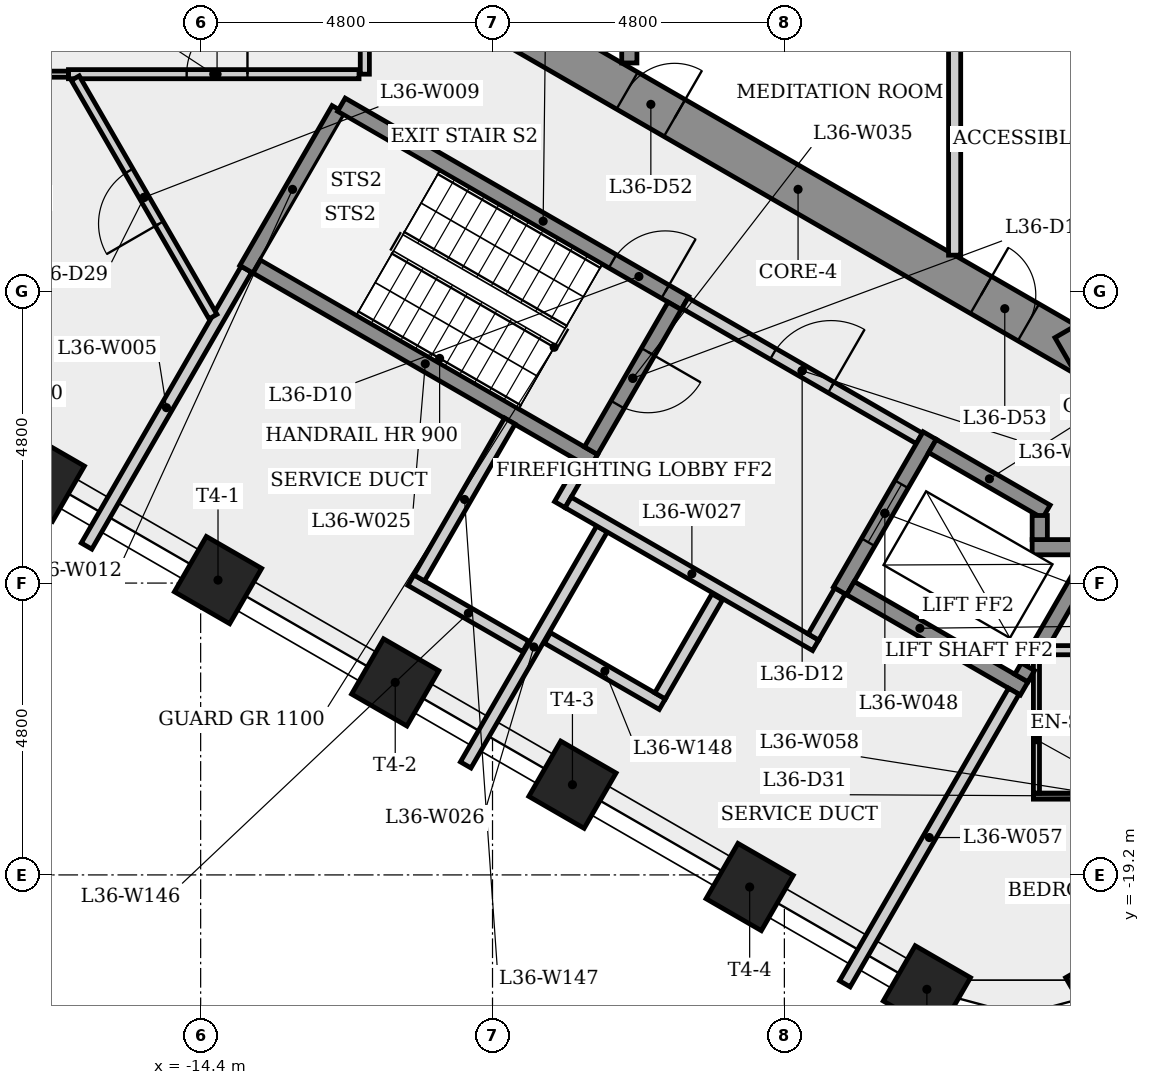
"""IFC4 building model, lengths in metres.
Left out: names, types, materials, properties, quantities, classifications, styles, units other than length and angle.
Written with IfcOpenShell. Run it as: python <this file> out.ifc"""

import sys

from ifc_helpers import new_model, si_unit, direction, frame, frame_2d, origin, origin_2d, place, context, subcontext, project, spatial, rectangle, extrude, element, fill, save


model = new_model("IFC4")
c1 = context("Model", 3, precision=1e-05, world=origin(), true_north=direction((0.0, 1.0)))
c2 = subcontext(c1, "Body", "Model", "MODEL_VIEW")
j1 = project(units=[si_unit("LENGTHUNIT", "METRE"), si_unit("PLANEANGLEUNIT", "RADIAN")], contexts=[c1])
p1 = place(None, origin())
s1 = spatial("IfcSite", under=j1, at=p1, CompositionType="ELEMENT")
p2 = place(p1, origin())
s2 = spatial("IfcBuilding", under=s1, at=p2, CompositionType="ELEMENT")
p3 = place(p2, frame((0.0, 0.0, 135.9)))
s3 = spatial("IfcBuildingStorey", under=s2, at=p3, CompositionType="ELEMENT", Elevation=135.9)
p4 = place(p3, frame((-9.325, -5.182, 0.0), z_axis=(0.0, 0.0, 1.0), x_axis=(0.866023993627, -0.500002442456, 0.0)))
e1 = element("IfcWall", 1, at=p4, inside=s3, PredefinedType="SHEAR", context=c2, shape_type="SweptSolid", body=[
    extrude(rectangle(XDim=10.97, YDim=0.7, at=frame_2d((5.485, 0.0))), origin(), (0.0, 0.0, 1.0), 4.0),
])
p5 = place(p4, frame((2.239, 0.0, 0.0)))
e2 = element("IfcOpeningElement", 2, at=p5, cuts=e1, PredefinedType="OPENING", context=c2, shape_type="SweptSolid", body=[
    extrude(rectangle(XDim=0.9, YDim=2.1, at=frame_2d((0.45, 1.05))), frame((0.0, 0.36, 0.0), z_axis=(0.0, -1.0, 0.0), x_axis=(1.0, 0.0, 0.0)), (0.0, 0.0, 1.0), 0.72),
])
p6 = place(p4, frame((8.96, 0.0, 0.0)))
e3 = element("IfcOpeningElement", 3, at=p6, cuts=e1, PredefinedType="OPENING", context=c2, shape_type="SweptSolid", body=[
    extrude(rectangle(XDim=0.9, YDim=2.1, at=frame_2d((0.45, 1.05))), frame((0.0, 0.36, 0.0), z_axis=(0.0, -1.0, 0.0), x_axis=(1.0, 0.0, 0.0)), (0.0, 0.0, 1.0), 0.72),
])
p7 = place(p3, frame((-0.175, -10.667, 0.0), z_axis=(0.0, 0.0, 1.0), x_axis=(0.866023993627, 0.500002442456, 0.0)))
e4 = element("IfcWall", 4, at=p7, inside=s3, PredefinedType="SHEAR", context=c2, shape_type="SweptSolid", body=[
    extrude(rectangle(XDim=10.97, YDim=0.7, at=frame_2d((5.485, 0.0))), origin(), (0.0, 0.0, 1.0), 4.0),
])
p8 = place(p7, frame((7.137, 0.0, 0.0)))
e5 = element("IfcOpeningElement", 5, at=p8, cuts=e4, PredefinedType="OPENING", context=c2, shape_type="SweptSolid", body=[
    extrude(rectangle(XDim=0.9, YDim=2.1, at=frame_2d((0.45, 1.05))), frame((0.0, 0.36, 0.0), z_axis=(0.0, -1.0, 0.0), x_axis=(1.0, 0.0, 0.0)), (0.0, 0.0, 1.0), 0.72),
])
for number, where, z_axis, x_axis in (
    (6, (-17.029, -12.668, 0.0), (0.0, 0.0, 1.0), (-0.5, -0.866, 0.0)),
    (7, (-14.115, -14.351, 0.0), (0.0, 0.0, 1.0), (-0.5, -0.866, 0.0)),
    (8, (-11.2, -16.034, 0.0), (0.0, 0.0, 1.0), (-0.5, -0.866, 0.0)),
    (9, (-8.286, -17.716, 0.0), (0.0, 0.0, 1.0), (-0.5, -0.866, 0.0)),
    (10, (-5.371, -19.399, 0.0), (0.0, 0.0, 1.0), (-0.5, -0.866, 0.0)),
    (11, (-2.457, -21.082, 0.0), (0.0, 0.0, 1.0), (-0.5, -0.866, 0.0)),
    (12, (0.543, -21.082, 0.0), (0.0, 0.0, 1.0), (0.5, -0.866, 0.0)),
):
    element("IfcColumn", number, at=place(p3, frame(where, z_axis=z_axis, x_axis=x_axis)), inside=s3, PredefinedType="COLUMN", context=c2, shape_type="SweptSolid", body=[
        extrude(rectangle(XDim=1.05, YDim=1.05, at=origin_2d()), origin(), (0.0, 0.0, 1.0), 4.0),
    ])
p9 = place(p3, frame((-16.574, -6.03, 0.0), z_axis=(0.0, 0.0, 1.0), x_axis=(1.0, 0.0, 0.0)))
e13 = element("IfcWall", 13, at=p9, inside=s3, PredefinedType="PARTITIONING", context=c2, shape_type="SweptSolid", body=[
    extrude(rectangle(XDim=4.779, YDim=0.15, at=frame_2d((2.389, 0.0))), origin(), (0.0, 0.0, 1.0), 3.6),
])
p10 = place(p9, frame((1.944, 0.0, 0.0)))
e14 = element("IfcOpeningElement", 14, at=p10, cuts=e13, PredefinedType="OPENING", context=c2, shape_type="SweptSolid", body=[
    extrude(rectangle(XDim=1.0, YDim=2.1, at=frame_2d((0.5, 1.05))), frame((0.0, 0.085, 0.0), z_axis=(0.0, -1.0, 0.0), x_axis=(1.0, 0.0, 0.0)), (0.0, 0.0, 1.0), 0.17),
])
p11 = place(p3, frame((-16.574, -6.03, 0.0), z_axis=(0.0, 0.0, 1.0), x_axis=(-1.0, 0.0, 0.0)))
e15 = element("IfcWall", 15, at=p11, inside=s3, PredefinedType="PARTITIONING", context=c2, shape_type="SweptSolid", body=[
    extrude(rectangle(XDim=1.99, YDim=0.1, at=frame_2d((0.995, 0.0))), origin(), (0.0, 0.0, 1.0), 3.6),
])
p12 = place(p3, frame((-16.276, -13.791, 0.0), z_axis=(0.0, 0.0, 1.0), x_axis=(0.499970375258, 0.866042506961, 0.0)))
e16 = element("IfcWall", 16, at=p12, inside=s3, PredefinedType="PLUMBINGWALL", context=c2, shape_type="SweptSolid", body=[
    extrude(rectangle(XDim=5.257, YDim=0.2, at=frame_2d((2.628, 0.0))), origin(), (0.0, 0.0, 1.0), 3.6),
])
p13 = place(p3, frame((-14.197, -10.017, 0.0), z_axis=(0.0, 0.0, 1.0), x_axis=(-0.500035089595, 0.866005143849, 0.0)))
e17 = element("IfcWall", 17, at=p13, inside=s3, PredefinedType="PARTITIONING", context=c2, shape_type="SweptSolid", body=[
    extrude(rectangle(XDim=4.529, YDim=0.15, at=frame_2d((2.265, 0.0))), origin(), (0.0, 0.0, 1.0), 3.6),
])
p14 = place(p13, frame((1.764, 0.0, 0.0)))
e18 = element("IfcOpeningElement", 18, at=p14, cuts=e17, PredefinedType="OPENING", context=c2, shape_type="SweptSolid", body=[
    extrude(rectangle(XDim=1.0, YDim=2.1, at=frame_2d((0.5, 1.05))), frame((0.0, 0.085, 0.0), z_axis=(0.0, -1.0, 0.0), x_axis=(1.0, 0.0, 0.0)), (0.0, 0.0, 1.0), 0.17),
])
p15 = place(p3, frame((-13.648, -9.239, 0.0), z_axis=(0.0, 0.0, 1.0), x_axis=(0.50000556753, 0.866022189346, 0.0)))
e19 = element("IfcWall", 19, at=p15, inside=s3, PredefinedType="SHEAR", context=c2, shape_type="SweptSolid", body=[
    extrude(rectangle(XDim=3.036, YDim=0.25, at=frame_2d((1.518, 0.0))), origin(), (0.0, 0.0, 1.0), 3.6),
])
p16 = place(p3, frame((-12.085, -6.532, 0.0), z_axis=(0.0, 0.0, 1.0), x_axis=(0.86604373436, -0.499968249168, 0.0)))
e20 = element("IfcWall", 20, at=p16, inside=s3, PredefinedType="SHEAR", context=c2, shape_type="SweptSolid", body=[
    extrude(rectangle(XDim=1.118, YDim=0.25, at=frame_2d((0.559, 0.0))), origin(), (0.0, 0.0, 1.0), 3.6),
])
p17 = place(p3, frame((-11.7, 6.105, 0.0), z_axis=(0.0, 0.0, 1.0), x_axis=(0.0, -1.0, 0.0)))
e21 = element("IfcWall", 21, at=p17, inside=s3, PredefinedType="PARTITIONING", context=c2, shape_type="SweptSolid", body=[
    extrude(rectangle(XDim=12.135, YDim=0.15, at=frame_2d((6.067, 0.0))), origin(), (0.0, 0.0, 1.0), 3.6),
])
p18 = place(p17, frame((6.815, 0.0, 0.0)))
e22 = element("IfcOpeningElement", 22, at=p18, cuts=e21, PredefinedType="OPENING", context=c2, shape_type="SweptSolid", body=[
    extrude(rectangle(XDim=0.9, YDim=2.1, at=frame_2d((0.45, 1.05))), frame((0.0, 0.085, 0.0), z_axis=(0.0, -1.0, 0.0), x_axis=(1.0, 0.0, 0.0)), (0.0, 0.0, 1.0), 0.17),
])
p19 = place(p3, frame((-11.1, -7.101, 0.0), z_axis=(0.0, 0.0, 1.0), x_axis=(0.866028615007, -0.499994437958, 0.0)))
e23 = element("IfcWall", 23, at=p19, inside=s3, PredefinedType="SHEAR", context=c2, shape_type="SweptSolid", body=[
    extrude(rectangle(XDim=5.387, YDim=0.25, at=frame_2d((2.694, 0.0))), origin(), (0.0, 0.0, 1.0), 3.6),
])
p20 = place(p19, frame((4.012, 0.0, 0.0)))
e24 = element("IfcOpeningElement", 24, at=p20, cuts=e23, PredefinedType="OPENING", context=c2, shape_type="SweptSolid", body=[
    extrude(rectangle(XDim=1.0, YDim=2.1, at=frame_2d((0.5, 1.05))), frame((0.0, 0.135, 0.0), z_axis=(0.0, -1.0, 0.0), x_axis=(1.0, 0.0, 0.0)), (0.0, 0.0, 1.0), 0.27),
])
p21 = place(p3, frame((-8.493, -13.11, 0.0), z_axis=(0.0, 0.0, 1.0), x_axis=(0.500067724834, 0.865986299303, 0.0)))
e25 = element("IfcWall", 25, at=p21, inside=s3, PredefinedType="PLUMBINGWALL", context=c2, shape_type="SweptSolid", body=[
    extrude(rectangle(XDim=0.775, YDim=0.2, at=frame_2d((0.388, 0.0))), origin(), (0.0, 0.0, 1.0), 3.6),
])
p22 = place(p3, frame((-7.935, -12.393, 0.0), z_axis=(0.0, 0.0, 1.0), x_axis=(-0.866025499775, 0.499999833739, 0.0)))
e26 = element("IfcWall", 26, at=p22, inside=s3, PredefinedType="SHEAR", context=c2, shape_type="SweptSolid", body=[
    extrude(rectangle(XDim=6.4, YDim=0.25, at=frame_2d((3.2, 0.0))), origin(), (0.0, 0.0, 1.0), 3.6),
])
p23 = place(p3, frame((-7.8, -13.51, 0.0), z_axis=(0.0, 0.0, 1.0), x_axis=(-0.499994393058, -0.866028640929, 0.0)))
e27 = element("IfcWall", 27, at=p23, inside=s3, PredefinedType="PLUMBINGWALL", context=c2, shape_type="SweptSolid", body=[
    extrude(rectangle(XDim=4.481, YDim=0.2, at=frame_2d((2.241, 0.0))), origin(), (0.0, 0.0, 1.0), 3.6),
])
p24 = place(p3, frame((-8.356, -13.073, 0.0), z_axis=(0.0, 0.0, 1.0), x_axis=(0.866038532462, -0.499977259774, 0.0)))
e28 = element("IfcWall", 28, at=p24, inside=s3, PredefinedType="PLUMBINGWALL", context=c2, shape_type="SweptSolid", body=[
    extrude(rectangle(XDim=4.7, YDim=0.2, at=frame_2d((2.35, 0.0))), origin(), (0.0, 0.0, 1.0), 3.6),
])
p25 = place(p3, frame((-7.35, -5.846, 0.0), z_axis=(0.0, 0.0, 1.0), x_axis=(0.0, 1.0, 0.0)))
e29 = element("IfcWall", 29, at=p25, inside=s3, PredefinedType="SHEAR", context=c2, shape_type="SweptSolid", body=[
    extrude(rectangle(XDim=4.171, YDim=0.25, at=frame_2d((2.085, 0.0))), origin(), (0.0, 0.0, 1.0), 3.6),
])
p26 = place(p3, frame((-6.605, -9.841, 0.0), z_axis=(0.0, 0.0, 1.0), x_axis=(-0.499996545922, -0.866027397988, 0.0)))
e30 = element("IfcWall", 30, at=p26, inside=s3, PredefinedType="SHEAR", context=c2, shape_type="SweptSolid", body=[
    extrude(rectangle(XDim=2.75, YDim=0.25, at=frame_2d((1.375, 0.0))), origin(), (0.0, 0.0, 1.0), 3.6),
])
p27 = place(p26, frame((0.875, 0.0, 0.0)))
e31 = element("IfcOpeningElement", 31, at=p27, cuts=e30, PredefinedType="OPENING", context=c2, shape_type="SweptSolid", body=[
    extrude(rectangle(XDim=1.0, YDim=2.1, at=frame_2d((0.5, 1.05))), frame((0.0, 0.135, 0.0), z_axis=(0.0, -1.0, 0.0), x_axis=(1.0, 0.0, 0.0)), (0.0, 0.0, 1.0), 0.27),
])
p28 = place(p3, frame((-6.435, -9.795, 0.0), z_axis=(0.0, 0.0, 1.0), x_axis=(0.866012907634, -0.500021643343, 0.0)))
e32 = element("IfcWall", 32, at=p28, inside=s3, PredefinedType="PARTITIONING", context=c2, shape_type="SweptSolid", body=[
    extrude(rectangle(XDim=4.45, YDim=0.2, at=frame_2d((2.225, 0.0))), origin(), (0.0, 0.0, 1.0), 3.6),
])
p29 = place(p28, frame((1.675, 0.0, 0.0)))
e33 = element("IfcOpeningElement", 33, at=p29, cuts=e32, PredefinedType="OPENING", context=c2, shape_type="SweptSolid", body=[
    extrude(rectangle(XDim=1.1, YDim=2.1, at=frame_2d((0.55, 1.05))), frame((0.0, 0.11, 0.0), z_axis=(0.0, -1.0, 0.0), x_axis=(1.0, 0.0, 0.0)), (0.0, 0.0, 1.0), 0.22),
])
p30 = place(p3, frame((-3.885, -14.529, 0.0), z_axis=(0.0, 0.0, 1.0), x_axis=(-0.499859285417, -0.866106630146, 0.0)))
e34 = element("IfcWall", 34, at=p30, inside=s3, PredefinedType="PLUMBINGWALL", context=c2, shape_type="SweptSolid", body=[
    extrude(rectangle(XDim=0.875, YDim=0.2, at=frame_2d((0.438, 0.0))), origin(), (0.0, 0.0, 1.0), 3.6),
])
p31 = place(p3, frame((-2.41, -11.974, 0.0), z_axis=(0.0, 0.0, 1.0), x_axis=(-0.500001826776, -0.866024349092, 0.0)))
e35 = element("IfcWall", 35, at=p31, inside=s3, PredefinedType="SHEAR", context=c2, shape_type="SweptSolid", body=[
    extrude(rectangle(XDim=2.95, YDim=0.25, at=frame_2d((1.475, 0.0))), origin(), (0.0, 0.0, 1.0), 3.6),
])
p32 = place(p31, frame((0.925, 0.0, 0.0)))
e36 = element("IfcOpeningElement", 36, at=p32, cuts=e35, PredefinedType="OPENING", context=c2, shape_type="SweptSolid", body=[
    extrude(rectangle(XDim=1.1, YDim=2.1, at=frame_2d((0.55, 1.05))), frame((0.0, 0.135, 0.0), z_axis=(0.0, -1.0, 0.0), x_axis=(1.0, 0.0, 0.0)), (0.0, 0.0, 1.0), 0.27),
])
p33 = place(p3, frame((-2.364, -12.145, 0.0), z_axis=(0.0, 0.0, 1.0), x_axis=(0.86603892542, -0.499976579108, 0.0)))
e37 = element("IfcWall", 37, at=p33, inside=s3, PredefinedType="SHEAR", context=c2, shape_type="SweptSolid", body=[
    extrude(rectangle(XDim=2.162, YDim=0.25, at=frame_2d((1.081, 0.0))), origin(), (0.0, 0.0, 1.0), 3.6),
])
p34 = place(p3, frame((-2.0, -5.275, 0.0), z_axis=(0.0, 0.0, 1.0), x_axis=(0.0, -1.0, 0.0)))
e38 = element("IfcWall", 38, at=p34, inside=s3, PredefinedType="PARTITIONING", context=c2, shape_type="SweptSolid", body=[
    extrude(rectangle(XDim=3.732, YDim=0.2, at=frame_2d((1.866, 0.0))), origin(), (0.0, 0.0, 1.0), 3.6),
])
p35 = place(p3, frame((-0.856, -16.133, 0.0), z_axis=(0.0, 0.0, 1.0), x_axis=(-0.866021716278, 0.500006386895, 0.0)))
e39 = element("IfcWall", 39, at=p35, inside=s3, PredefinedType="SHEAR", context=c2, shape_type="SweptSolid", body=[
    extrude(rectangle(XDim=3.3, YDim=0.25, at=frame_2d((1.65, 0.0))), origin(), (0.0, 0.0, 1.0), 3.6),
])
p36 = place(p3, frame((-1.027, -16.179, 0.0), z_axis=(0.0, 0.0, 1.0), x_axis=(-0.499995019066, -0.866028279509, 0.0)))
e40 = element("IfcWall", 40, at=p36, inside=s3, PredefinedType="PLUMBINGWALL", context=c2, shape_type="SweptSolid", body=[
    extrude(rectangle(XDim=5.557, YDim=0.2, at=frame_2d((2.778, 0.0))), origin(), (0.0, 0.0, 1.0), 3.6),
])
p37 = place(p3, frame((-0.705, -17.904, 0.0), z_axis=(0.0, 0.0, 1.0), x_axis=(1.0, 0.0, 0.0)))
e41 = element("IfcWall", 41, at=p37, inside=s3, PredefinedType="PARTITIONING", context=c2, shape_type="SweptSolid", body=[
    extrude(rectangle(XDim=2.48, YDim=0.1, at=frame_2d((1.24, 0.0))), origin(), (0.0, 0.0, 1.0), 3.6),
])
p38 = place(p37, frame((0.84, 0.0, 0.0)))
e42 = element("IfcOpeningElement", 42, at=p38, cuts=e41, PredefinedType="OPENING", context=c2, shape_type="SweptSolid", body=[
    extrude(rectangle(XDim=0.8, YDim=2.1, at=frame_2d((0.4, 1.05))), frame((0.0, 0.06, 0.0), z_axis=(0.0, -1.0, 0.0), x_axis=(1.0, 0.0, 0.0)), (0.0, 0.0, 1.0), 0.12),
])
p39 = place(p3, frame((-0.655, -15.659, 0.0), z_axis=(0.0, 0.0, 1.0), x_axis=(0.0, -1.0, 0.0)))
e43 = element("IfcWall", 43, at=p39, inside=s3, PredefinedType="PARTITIONING", context=c2, shape_type="SweptSolid", body=[
    extrude(rectangle(XDim=2.195, YDim=0.1, at=frame_2d((1.098, 0.0))), origin(), (0.0, 0.0, 1.0), 3.6),
])
p40 = place(p3, frame((-0.794, -15.776, 0.0), z_axis=(0.0, 0.0, 1.0), x_axis=(-0.500409926597, -0.865788603161, 0.0)))
e44 = element("IfcWall", 44, at=p40, inside=s3, PredefinedType="SHEAR", context=c2, shape_type="SweptSolid", body=[
    extrude(rectangle(XDim=0.215, YDim=0.25, at=frame_2d((0.107, 0.0))), origin(), (0.0, 0.0, 1.0), 4.0),
])
p41 = place(p3, frame((-0.725, -13.81, 0.0), z_axis=(0.0, 0.0, 1.0), x_axis=(1.0, 0.0, 0.0)))
e45 = element("IfcWall", 45, at=p41, inside=s3, PredefinedType="SHEAR", context=c2, shape_type="SweptSolid", body=[
    extrude(rectangle(XDim=1.191, YDim=0.25, at=frame_2d((0.595, 0.0))), origin(), (0.0, 0.0, 1.0), 3.6),
])
p42 = place(p3, frame((-0.6, -13.289, 0.0), z_axis=(0.0, 0.0, 1.0), x_axis=(0.0, -1.0, 0.0)))
e46 = element("IfcWall", 46, at=p42, inside=s3, PredefinedType="SHEAR", context=c2, shape_type="SweptSolid", body=[
    extrude(rectangle(XDim=0.396, YDim=0.25, at=frame_2d((0.198, 0.0))), origin(), (0.0, 0.0, 1.0), 4.0),
])
p43 = place(p3, frame((0.278, -13.918, 0.0), z_axis=(0.0, 0.0, 1.0), x_axis=(-0.499955309825, -0.866051204132, 0.0)))
e47 = element("IfcWall", 47, at=p43, inside=s3, PredefinedType="SHEAR", context=c2, shape_type="SweptSolid", body=[
    extrude(rectangle(XDim=1.906, YDim=0.25, at=frame_2d((0.953, 0.0))), origin(), (0.0, 0.0, 1.0), 4.0),
])
p44 = place(p3, frame((-0.512, -15.504, 0.0), z_axis=(0.0, 0.0, 1.0), x_axis=(1.0, 0.0, 0.0)))
e48 = element("IfcWall", 48, at=p44, inside=s3, PredefinedType="PARTITIONING", context=c2, shape_type="SweptSolid", body=[
    extrude(rectangle(XDim=3.821, YDim=0.15, at=frame_2d((1.91, 0.0))), origin(), (0.0, 0.0, 1.0), 3.6),
])
p45 = place(p44, frame((2.594, 0.0, 0.0)))
e49 = element("IfcOpeningElement", 49, at=p45, cuts=e48, PredefinedType="OPENING", context=c2, shape_type="SweptSolid", body=[
    extrude(rectangle(XDim=0.9, YDim=2.1, at=frame_2d((0.45, 1.05))), frame((0.0, 0.085, 0.0), z_axis=(0.0, -1.0, 0.0), x_axis=(1.0, 0.0, 0.0)), (0.0, 0.0, 1.0), 0.17),
])
p46 = place(p3, frame((-9.054, -15.442, 0.0), z_axis=(0.0, 0.0, 1.0), x_axis=(-0.866008413041, 0.500029427677, 0.0)))
e50 = element("IfcWall", 50, at=p46, inside=s3, PredefinedType="PLUMBINGWALL", context=c2, shape_type="SweptSolid", body=[
    extrude(rectangle(XDim=2.18, YDim=0.2, at=frame_2d((1.09, 0.0))), origin(), (0.0, 0.0, 1.0), 3.6),
])
p47 = place(p3, frame((-10.805, -14.315, 0.0), z_axis=(0.0, 0.0, 1.0), x_axis=(0.500086491905, 0.8659754619, 0.0)))
e51 = element("IfcWall", 51, at=p47, inside=s3, PredefinedType="PLUMBINGWALL", context=c2, shape_type="SweptSolid", body=[
    extrude(rectangle(XDim=2.98, YDim=0.2, at=frame_2d((1.49, 0.0))), origin(), (0.0, 0.0, 1.0), 3.6),
])
p48 = place(p3, frame((-6.808, -16.392, 0.0), z_axis=(0.0, 0.0, 1.0), x_axis=(-0.866008413041, 0.500029427677, 0.0)))
e52 = element("IfcWall", 52, at=p48, inside=s3, PredefinedType="PLUMBINGWALL", context=c2, shape_type="SweptSolid", body=[
    extrude(rectangle(XDim=2.18, YDim=0.2, at=frame_2d((1.09, 0.0))), origin(), (0.0, 0.0, 1.0), 3.6),
])
p49 = place(p3, frame((-5.905, -14.627, 0.0), z_axis=(0.0, 0.0, 1.0), x_axis=(-0.499966013754, -0.866045024864, 0.0)))
e53 = element("IfcWall", 53, at=p49, inside=s3, PredefinedType="PLUMBINGWALL", context=c2, shape_type="SweptSolid", body=[
    extrude(rectangle(XDim=1.88, YDim=0.2, at=frame_2d((0.94, 0.0))), origin(), (0.0, 0.0, 1.0), 3.6),
])
p50 = place(p20, origin())
e54 = element("IfcDoor", 54, at=p50, inside=s3, OperationType="SINGLE_SWING_RIGHT", PredefinedType="DOOR", context=c2, shape_type="SweptSolid", body=[
    extrude(rectangle(XDim=1.0, YDim=2.1, at=frame_2d((0.5, 1.05))), frame((0.0, 0.025, 0.0), z_axis=(0.0, -1.0, 0.0), x_axis=(1.0, 0.0, 0.0)), (0.0, 0.0, 1.0), 0.05),
])
fill(e24, e54)
p51 = place(p27, origin())
e55 = element("IfcDoor", 55, at=p51, inside=s3, OperationType="SINGLE_SWING_LEFT", PredefinedType="DOOR", context=c2, shape_type="SweptSolid", body=[
    extrude(rectangle(XDim=1.0, YDim=2.1, at=frame_2d((0.5, 1.05))), frame((0.0, 0.025, 0.0), z_axis=(0.0, -1.0, 0.0), x_axis=(1.0, 0.0, 0.0)), (0.0, 0.0, 1.0), 0.05),
])
fill(e31, e55)
p52 = place(p29, origin())
e56 = element("IfcDoor", 56, at=p52, inside=s3, OperationType="SINGLE_SWING_RIGHT", PredefinedType="DOOR", context=c2, shape_type="SweptSolid", body=[
    extrude(rectangle(XDim=1.1, YDim=2.1, at=frame_2d((0.55, 1.05))), frame((0.0, 0.025, 0.0), z_axis=(0.0, -1.0, 0.0), x_axis=(1.0, 0.0, 0.0)), (0.0, 0.0, 1.0), 0.05),
])
fill(e33, e56)
p53 = place(p32, origin())
e57 = element("IfcDoor", 57, at=p53, inside=s3, OperationType="SLIDING_TO_LEFT", PredefinedType="DOOR", context=c2, shape_type="SweptSolid", body=[
    extrude(rectangle(XDim=1.1, YDim=2.1, at=frame_2d((0.55, 1.05))), frame((0.0, 0.025, 0.0), z_axis=(0.0, -1.0, 0.0), x_axis=(1.0, 0.0, 0.0)), (0.0, 0.0, 1.0), 0.05),
])
fill(e36, e57)
p54 = place(p10, origin())
e58 = element("IfcDoor", 58, at=p54, inside=s3, OperationType="SINGLE_SWING_RIGHT", PredefinedType="DOOR", context=c2, shape_type="SweptSolid", body=[
    extrude(rectangle(XDim=1.0, YDim=2.1, at=frame_2d((0.5, 1.05))), frame((0.0, 0.025, 0.0), z_axis=(0.0, -1.0, 0.0), x_axis=(1.0, 0.0, 0.0)), (0.0, 0.0, 1.0), 0.05),
])
fill(e14, e58)
p55 = place(p14, origin())
e59 = element("IfcDoor", 59, at=p55, inside=s3, OperationType="SINGLE_SWING_LEFT", PredefinedType="DOOR", context=c2, shape_type="SweptSolid", body=[
    extrude(rectangle(XDim=1.0, YDim=2.1, at=frame_2d((0.5, 1.05))), frame((0.0, 0.025, 0.0), z_axis=(0.0, -1.0, 0.0), x_axis=(1.0, 0.0, 0.0)), (0.0, 0.0, 1.0), 0.05),
])
fill(e18, e59)
p56 = place(p5, origin())
e60 = element("IfcDoor", 60, at=p56, inside=s3, OperationType="SINGLE_SWING_RIGHT", PredefinedType="DOOR", context=c2, shape_type="SweptSolid", body=[
    extrude(rectangle(XDim=0.9, YDim=2.1, at=frame_2d((0.45, 1.05))), frame((0.0, 0.025, 0.0), z_axis=(0.0, -1.0, 0.0), x_axis=(1.0, 0.0, 0.0)), (0.0, 0.0, 1.0), 0.05),
])
fill(e2, e60)
p57 = place(p6, origin())
e61 = element("IfcDoor", 61, at=p57, inside=s3, OperationType="SINGLE_SWING_LEFT", PredefinedType="DOOR", context=c2, shape_type="SweptSolid", body=[
    extrude(rectangle(XDim=0.9, YDim=2.1, at=frame_2d((0.45, 1.05))), frame((0.0, 0.025, 0.0), z_axis=(0.0, -1.0, 0.0), x_axis=(1.0, 0.0, 0.0)), (0.0, 0.0, 1.0), 0.05),
])
fill(e3, e61)
save(model, sys.argv[1])
